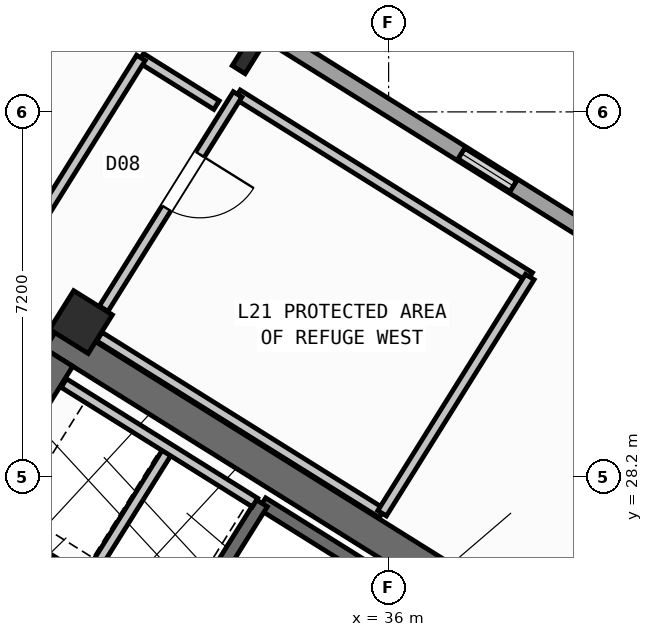
"""IFC4 building model, lengths in metres.
Left out: names, types, materials, properties, quantities, classifications, styles, units other than length and angle.
Written with IfcOpenShell. Run it as: python <this file> out.ifc"""

import sys

from ifc_helpers import new_model, si_unit, direction, frame, frame_2d, origin, origin_2d, place, context, subcontext, project, spatial, rectangle, hollow_rectangle, i_section, extrude, source, transform, mapped, element, fill, save


model = new_model("IFC4")
c1 = context("Model", 3, precision=1e-05, world=origin(), true_north=direction((0.0, 1.0)))
c2 = subcontext(c1, "Body", "Model", "MODEL_VIEW")
j1 = project(units=[si_unit("LENGTHUNIT", "METRE"), si_unit("PLANEANGLEUNIT", "RADIAN")], contexts=[c1])
p1 = place(None, origin())
s1 = spatial("IfcSite", under=j1, at=p1, CompositionType="ELEMENT")
p2 = place(p1, origin())
s2 = spatial("IfcBuilding", under=s1, at=p2, CompositionType="ELEMENT")
p3 = place(p2, frame((0.0, 0.0, 84.6)))
s3 = spatial("IfcBuildingStorey", under=s2, at=p3, CompositionType="ELEMENT", Elevation=84.6)
p4 = place(p3, frame((40.615, 23.983, 0.0), z_axis=(0.0, 0.0, 1.0), x_axis=(-0.848045953968, 0.529922692436, 0.0)))
e1 = element("IfcWall", 1, at=p4, inside=s3, PredefinedType="SHEAR", context=c2, shape_type="SweptSolid", body=[
    extrude(rectangle(XDim=13.24, YDim=0.65, at=frame_2d((6.62, 0.0))), origin(), (0.0, 0.0, 1.0), 5.15),
])
p5 = place(p3, frame((29.491, 30.552, 0.0), z_axis=(0.0, 0.0, 1.0), x_axis=(-0.529893103397, -0.8480644427, 0.0)))
e2 = element("IfcWall", 2, at=p5, inside=s3, PredefinedType="SHEAR", context=c2, shape_type="SweptSolid", body=[
    extrude(rectangle(XDim=3.525, YDim=0.65, at=frame_2d((1.763, 0.0))), origin(), (0.0, 0.0, 1.0), 5.15),
])
m1 = source(origin(), c2, "Body", "SweptSolid", [
    extrude(i_section(OverallWidth=0.3, OverallDepth=0.65, WebThickness=0.016, FlangeThickness=0.031, at=origin_2d()), origin(), (0.0, 0.0, 1.0), 5.4),
])
p6 = place(p3, frame((33.213, 36.509, 0.0), z_axis=(0.0, 0.0, 1.0), x_axis=(-0.848048096156, 0.529919264233, 0.0)))
e3 = element("IfcColumn", 3, at=p6, inside=s3, PredefinedType="COLUMN", context=c2, shape_type="MappedRepresentation", body=[
    mapped(m1, transform((0.0, 0.0, 0.0), scale=1.0)),
])
m2 = source(origin(), c2, "Body", "SweptSolid", [
    extrude(hollow_rectangle(XDim=0.9, YDim=0.9, WallThickness=0.036, at=origin_2d()), origin(), (0.0, 0.0, 1.0), 5.4),
])
p7 = place(p3, frame((29.928, 31.251, 0.0), z_axis=(0.0, 0.0, 1.0), x_axis=(-0.848048096156, 0.529919264233, 0.0)))
e4 = element("IfcColumn", 4, at=p7, inside=s3, PredefinedType="COLUMN", context=c2, shape_type="MappedRepresentation", body=[
    mapped(m2, transform((0.0, 0.0, 0.0), scale=1.0)),
])
p8 = place(p3, frame((31.76, 12.183, 0.0), z_axis=(0.0, 0.0, 1.0), x_axis=(-0.848047074256, 0.529920899612, 0.0)))
e5 = element("IfcWall", 5, at=p8, inside=s3, PredefinedType="STANDARD", context=c2, shape_type="SweptSolid", body=[
    extrude(rectangle(XDim=30.652, YDim=0.32, at=frame_2d((15.326, 0.0))), origin(), (0.0, 0.0, 1.0), 5.15),
])
p9 = place(p8, frame((5.029, 0.0, 0.95)))
e6 = element("IfcOpeningElement", 6, at=p9, cuts=e5, PredefinedType="OPENING", context=c2, shape_type="SweptSolid", body=[
    extrude(rectangle(XDim=1.25, YDim=1.4, at=frame_2d((0.625, 0.7))), frame((0.0, 0.17, 0.0), z_axis=(0.0, -1.0, 0.0), x_axis=(1.0, 0.0, 0.0)), (0.0, 0.0, 1.0), 0.34),
])
p10 = place(p8, frame((14.233, 0.0, 0.95)))
e7 = element("IfcOpeningElement", 7, at=p10, cuts=e5, PredefinedType="OPENING", context=c2, shape_type="SweptSolid", body=[
    extrude(rectangle(XDim=1.25, YDim=1.4, at=frame_2d((0.625, 0.7))), frame((0.0, 0.17, 0.0), z_axis=(0.0, -1.0, 0.0), x_axis=(1.0, 0.0, 0.0)), (0.0, 0.0, 1.0), 0.34),
])
p11 = place(p8, frame((20.633, 0.0, 0.95)))
e8 = element("IfcOpeningElement", 8, at=p11, cuts=e5, PredefinedType="OPENING", context=c2, shape_type="SweptSolid", body=[
    extrude(rectangle(XDim=1.25, YDim=1.4, at=frame_2d((0.625, 0.7))), frame((0.0, 0.17, 0.0), z_axis=(0.0, -1.0, 0.0), x_axis=(1.0, 0.0, 0.0)), (0.0, 0.0, 1.0), 0.34),
])
p12 = place(p8, frame((27.033, 0.0, 0.95)))
e9 = element("IfcOpeningElement", 9, at=p12, cuts=e5, PredefinedType="OPENING", context=c2, shape_type="SweptSolid", body=[
    extrude(rectangle(XDim=1.25, YDim=1.4, at=frame_2d((0.625, 0.7))), frame((0.0, 0.17, 0.0), z_axis=(0.0, -1.0, 0.0), x_axis=(1.0, 0.0, 0.0)), (0.0, 0.0, 1.0), 0.34),
])
p13 = place(p3, frame((17.424, 47.083, 0.0), z_axis=(0.0, 0.0, 1.0), x_axis=(0.848049927979, -0.529916332693, 0.0)))
e10 = element("IfcWall", 10, at=p13, inside=s3, PredefinedType="STANDARD", context=c2, shape_type="SweptSolid", body=[
    extrude(rectangle(XDim=29.223, YDim=0.32, at=frame_2d((14.612, 0.0))), origin(), (0.0, 0.0, 1.0), 5.15),
])
p14 = place(p13, frame((23.579, 0.0, 0.95)))
e11 = element("IfcOpeningElement", 11, at=p14, cuts=e10, PredefinedType="OPENING", context=c2, shape_type="SweptSolid", body=[
    extrude(rectangle(XDim=1.25, YDim=1.4, at=frame_2d((0.625, 0.7))), frame((0.0, 0.17, 0.0), z_axis=(0.0, -1.0, 0.0), x_axis=(1.0, 0.0, 0.0)), (0.0, 0.0, 1.0), 0.34),
])
p15 = place(p3, frame((39.721, 23.788, 0.0), z_axis=(0.0, 0.0, 1.0), x_axis=(-0.848054434086, 0.529909121291, 0.0)))
e12 = element("IfcWall", 12, at=p15, inside=s3, PredefinedType="SHEAR", context=c2, shape_type="SweptSolid", body=[
    extrude(rectangle(XDim=7.33, YDim=0.26, at=frame_2d((3.665, 0.0))), origin(), (0.0, 0.0, 1.0), 5.15),
])
p16 = place(p3, frame((33.496, 27.677, 0.0), z_axis=(0.0, 0.0, 1.0), x_axis=(-0.529908658664, -0.84805472316, 0.0)))
e13 = element("IfcWall", 13, at=p16, inside=s3, PredefinedType="SHEAR", context=c2, shape_type="SweptSolid", body=[
    extrude(rectangle(XDim=3.16, YDim=0.26, at=frame_2d((1.58, 0.0))), origin(), (0.0, 0.0, 1.0), 5.15),
])
p17 = place(p3, frame((31.822, 24.998, 0.0), z_axis=(0.0, 0.0, 1.0), x_axis=(-0.848058348634, 0.529902856485, 0.0)))
e14 = element("IfcWall", 14, at=p17, inside=s3, PredefinedType="STANDARD", context=c2, shape_type="SweptSolid", body=[
    extrude(rectangle(XDim=4.568, YDim=0.2, at=frame_2d((2.284, 0.0))), origin(), (0.0, 0.0, 1.0), 5.14),
])
p18 = place(p3, frame((31.645, 28.716, 0.0), z_axis=(0.0, 0.0, 1.0), x_axis=(-0.52986693015, -0.848080795876, 0.0)))
e15 = element("IfcWall", 15, at=p18, inside=s3, PredefinedType="STANDARD", context=c2, shape_type="SweptSolid", body=[
    extrude(rectangle(XDim=2.66, YDim=0.2, at=frame_2d((1.33, 0.0))), origin(), (0.0, 0.0, 1.0), 5.14),
])
p19 = place(p3, frame((33.363, 27.69, 0.0), z_axis=(0.0, 0.0, 1.0), x_axis=(-0.848053806312, 0.529910125964, 0.0)))
e16 = element("IfcWall", 16, at=p19, inside=s3, PredefinedType="STANDARD", context=c2, shape_type="SweptSolid", body=[
    extrude(rectangle(XDim=4.448, YDim=0.2, at=frame_2d((2.224, 0.0))), origin(), (0.0, 0.0, 1.0), 5.14),
])
p20 = place(p3, frame((38.786, 32.143, 0.0), z_axis=(0.0, 0.0, 1.0), x_axis=(-0.848048724775, 0.529918258231, 0.0)))
e17 = element("IfcWall", 17, at=p20, inside=s3, PredefinedType="STANDARD", context=c2, shape_type="SweptSolid", body=[
    extrude(rectangle(XDim=6.8, YDim=0.2, at=frame_2d((3.4, 0.0))), origin(), (0.0, 0.0, 1.0), 5.14),
])
p21 = place(p3, frame((35.872, 27.478, 0.0), z_axis=(0.0, 0.0, 1.0), x_axis=(-0.848042088546, 0.529928878299, 0.0)))
e18 = element("IfcWall", 18, at=p21, inside=s3, PredefinedType="STANDARD", context=c2, shape_type="SweptSolid", body=[
    extrude(rectangle(XDim=6.578, YDim=0.2, at=frame_2d((3.289, 0.0))), origin(), (0.0, 0.0, 1.0), 5.14),
])
p22 = place(p3, frame((38.786, 32.143, 0.0), z_axis=(0.0, 0.0, 1.0), x_axis=(-0.529947070012, -0.848030720544, 0.0)))
e19 = element("IfcWall", 19, at=p22, inside=s3, PredefinedType="STANDARD", context=c2, shape_type="SweptSolid", body=[
    extrude(rectangle(XDim=5.5, YDim=0.2, at=frame_2d((2.75, 0.0))), origin(), (0.0, 0.0, 1.0), 5.14),
])
p23 = place(p3, frame((33.02, 35.746, 0.0), z_axis=(0.0, 0.0, 1.0), x_axis=(-0.529915347887, -0.848050543349, 0.0)))
e20 = element("IfcWall", 20, at=p23, inside=s3, PredefinedType="STANDARD", context=c2, shape_type="SweptSolid", body=[
    extrude(rectangle(XDim=4.988, YDim=0.2, at=frame_2d((2.494, 0.0))), origin(), (0.0, 0.0, 1.0), 4.575),
])
p24 = place(p23, frame((1.4, 0.0, 0.0)))
e21 = element("IfcOpeningElement", 21, at=p24, cuts=e20, PredefinedType="OPENING", context=c2, shape_type="SweptSolid", body=[
    extrude(rectangle(XDim=1.25, YDim=2.15, at=frame_2d((0.625, 1.075))), frame((0.0, 0.11, 0.0), z_axis=(0.0, -1.0, 0.0), x_axis=(1.0, 0.0, 0.0)), (0.0, 0.0, 1.0), 0.22),
])
p25 = place(p3, frame((32.604, 35.534, 0.0), z_axis=(0.0, 0.0, 1.0), x_axis=(-0.848037269931, 0.529936589422, 0.0)))
e22 = element("IfcWall", 22, at=p25, inside=s3, PredefinedType="STANDARD", context=c2, shape_type="SweptSolid", body=[
    extrude(rectangle(XDim=1.76, YDim=0.2, at=frame_2d((0.88, 0.0))), origin(), (0.0, 0.0, 1.0), 5.14),
])
p26 = place(p3, frame((31.112, 36.467, 0.0), z_axis=(0.0, 0.0, 1.0), x_axis=(-0.529921156925, -0.848046913469, 0.0)))
e23 = element("IfcWall", 23, at=p26, inside=s3, PredefinedType="STANDARD", context=c2, shape_type="SweptSolid", body=[
    extrude(rectangle(XDim=11.85, YDim=0.2, at=frame_2d((5.925, 0.0))), origin(), (0.0, 0.0, 1.0), 5.14),
])
m3 = source(origin(), c2, "Body", "SweptSolid", [
    extrude(rectangle(XDim=1.25, YDim=1.4, at=frame_2d((0.625, 0.7))), frame((0.0, 0.03, 0.0), z_axis=(0.0, -1.0, 0.0), x_axis=(1.0, 0.0, 0.0)), (0.0, 0.0, 1.0), 0.06),
])
p27 = place(p14, origin())
e24 = element("IfcWindow", 24, at=p27, inside=s3, PartitioningType="SINGLE_PANEL", PredefinedType="WINDOW", context=c2, shape_type="MappedRepresentation", body=[
    mapped(m3, transform((0.0, 0.0, 0.0), scale=1.0)),
])
fill(e11, e24)
m4 = source(origin(), c2, "Body", "SweptSolid", [
    extrude(rectangle(XDim=1.25, YDim=2.15, at=frame_2d((0.625, 1.075))), frame((0.0, 0.025, 0.0), z_axis=(0.0, -1.0, 0.0), x_axis=(1.0, 0.0, 0.0)), (0.0, 0.0, 1.0), 0.05),
])
p28 = place(p24, origin())
e25 = element("IfcDoor", 25, at=p28, inside=s3, OperationType="SINGLE_SWING_LEFT", PredefinedType="DOOR", context=c2, shape_type="MappedRepresentation", body=[
    mapped(m4, transform((0.0, 0.0, 0.0), scale=1.0)),
])
fill(e21, e25)
save(model, sys.argv[1])
